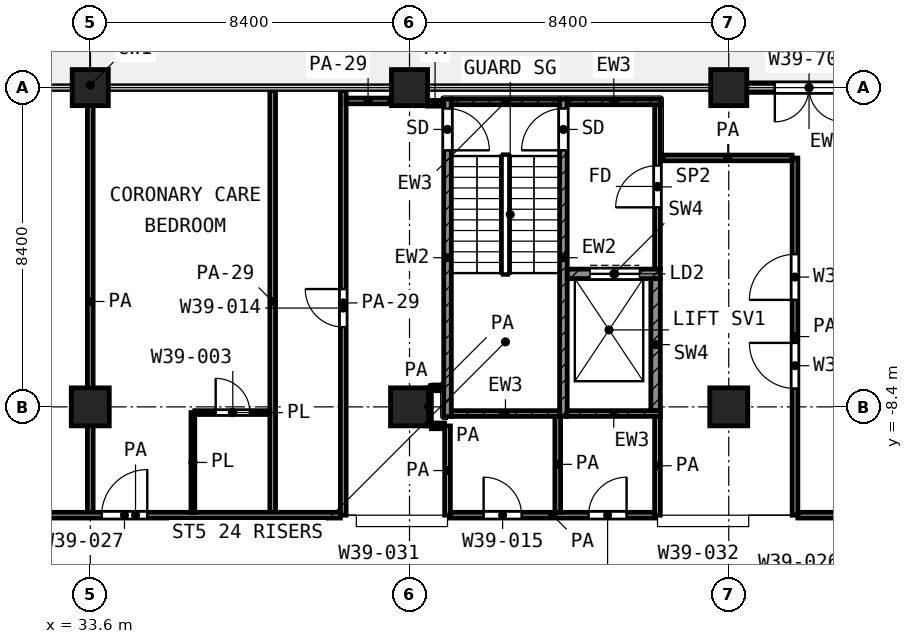
"""IFC4 building model, lengths in metres.
Left out: names, types, materials, properties, quantities, classifications, styles, units other than length and angle.
Written with IfcOpenShell. Run it as: python <this file> out.ifc"""

import sys

from ifc_helpers import new_model, si_unit, direction, frame, frame_2d, origin, origin_2d, place, context, subcontext, project, spatial, rectangle, extrude, element, fill, save


model = new_model("IFC4")
c1 = context("Model", 3, precision=1e-05, world=origin(), true_north=direction((0.0, 1.0)))
c2 = subcontext(c1, "Body", "Model", "MODEL_VIEW")
j1 = project(units=[si_unit("LENGTHUNIT", "METRE"), si_unit("PLANEANGLEUNIT", "RADIAN")], contexts=[c1])
p1 = place(None, origin())
s1 = spatial("IfcSite", under=j1, at=p1, CompositionType="ELEMENT")
p2 = place(p1, origin())
s2 = spatial("IfcBuilding", under=s1, at=p2, CompositionType="ELEMENT")
p3 = place(p2, frame((0.0, 0.0, 171.0)))
s3 = spatial("IfcBuildingStorey", under=s2, at=p3, CompositionType="ELEMENT", Elevation=171.0)
for number, where, z_axis, x_axis in (
    (1, (33.6, 0.0, 0.0), (0.0, 0.0, 1.0), (1.0, 0.0, 0.0)),
    (2, (42.0, 0.0, 0.0), (0.0, 0.0, 1.0), (1.0, 0.0, 0.0)),
    (3, (50.4, 0.0, 0.0), (0.0, 0.0, 1.0), (1.0, 0.0, 0.0)),
):
    element("IfcColumn", number, at=place(p3, frame(where, z_axis=z_axis, x_axis=x_axis)), inside=s3, PredefinedType="COLUMN", context=c2, shape_type="SweptSolid", body=[
        extrude(rectangle(XDim=0.95, YDim=0.95, at=origin_2d()), origin(), (0.0, 0.0, 1.0), 4.2),
    ])
for number, where, z_axis, x_axis in (
    (4, (33.6, -8.4, 0.0), (0.0, 0.0, 1.0), (1.0, 0.0, 0.0)),
    (5, (42.0, -8.4, 0.0), (0.0, 0.0, 1.0), (1.0, 0.0, 0.0)),
    (6, (50.4, -8.4, 0.0), (0.0, 0.0, 1.0), (1.0, 0.0, 0.0)),
):
    element("IfcColumn", number, at=place(p3, frame(where, z_axis=z_axis, x_axis=x_axis)), inside=s3, PredefinedType="COLUMN", context=c2, shape_type="SweptSolid", body=[
        extrude(rectangle(XDim=1.0, YDim=1.0, at=origin_2d()), origin(), (0.0, 0.0, 1.0), 4.2),
    ])
p4 = place(p3, frame((54.15, 0.0, 0.0), z_axis=(0.0, 0.0, 1.0), x_axis=(-1.0, 0.0, 0.0)))
e7 = element("IfcWall", 7, at=p4, inside=s3, PredefinedType="SOLIDWALL", context=c2, shape_type="SweptSolid", body=[
    extrude(rectangle(XDim=3.275, YDim=0.25, at=frame_2d((1.637, 0.0))), origin(), (0.0, 0.0, 1.0), 2.58),
])
p5 = place(p4, frame((0.738, 0.0, 0.0)))
e8 = element("IfcOpeningElement", 8, at=p5, cuts=e7, PredefinedType="OPENING", context=c2, shape_type="SweptSolid", body=[
    extrude(rectangle(XDim=1.8, YDim=2.1, at=frame_2d((0.9, 1.05))), frame((0.0, 0.135, 0.0), z_axis=(0.0, -1.0, 0.0), x_axis=(1.0, 0.0, 0.0)), (0.0, 0.0, 1.0), 0.27),
])
p6 = place(p3, frame((43.0, -8.65, 0.0), z_axis=(0.0, 0.0, 1.0), x_axis=(0.0, 1.0, 0.0)))
e9 = element("IfcWall", 9, at=p6, inside=s3, PredefinedType="SHEAR", context=c2, shape_type="SweptSolid", body=[
    extrude(rectangle(XDim=8.35, YDim=0.2, at=frame_2d((4.175, 0.0))), origin(), (0.0, 0.0, 1.0), 3.6),
])
p7 = place(p6, frame((7.0, 0.0, 0.0)))
e10 = element("IfcOpeningElement", 10, at=p7, cuts=e9, PredefinedType="OPENING", context=c2, shape_type="SweptSolid", body=[
    extrude(rectangle(XDim=1.1, YDim=2.1, at=frame_2d((0.55, 1.05))), frame((0.0, 0.11, 0.0), z_axis=(0.0, -1.0, 0.0), x_axis=(1.0, 0.0, 0.0)), (0.0, 0.0, 1.0), 0.22),
])
p8 = place(p3, frame((46.05, -8.65, 0.0), z_axis=(0.0, 0.0, 1.0), x_axis=(0.0, 1.0, 0.0)))
e11 = element("IfcWall", 11, at=p8, inside=s3, PredefinedType="SHEAR", context=c2, shape_type="SweptSolid", body=[
    extrude(rectangle(XDim=8.35, YDim=0.2, at=frame_2d((4.175, 0.0))), origin(), (0.0, 0.0, 1.0), 3.6),
])
p9 = place(p8, frame((7.0, 0.0, 0.0)))
e12 = element("IfcOpeningElement", 12, at=p9, cuts=e11, PredefinedType="OPENING", context=c2, shape_type="SweptSolid", body=[
    extrude(rectangle(XDim=1.1, YDim=2.1, at=frame_2d((0.55, 1.05))), frame((0.0, 0.11, 0.0), z_axis=(0.0, -1.0, 0.0), x_axis=(1.0, 0.0, 0.0)), (0.0, 0.0, 1.0), 0.22),
])
p10 = place(p3, frame((43.1, -0.375, 0.0), z_axis=(0.0, 0.0, 1.0), x_axis=(1.0, 0.0, 0.0)))
e13 = element("IfcWall", 13, at=p10, inside=s3, PredefinedType="SHEAR", context=c2, shape_type="SweptSolid", body=[
    extrude(rectangle(XDim=2.85, YDim=0.15, at=frame_2d((1.425, 0.0))), origin(), (0.0, 0.0, 1.0), 3.6),
])
p11 = place(p3, frame((46.15, -0.375, 0.0), z_axis=(0.0, 0.0, 1.0), x_axis=(1.0, 0.0, 0.0)))
e14 = element("IfcWall", 14, at=p11, inside=s3, PredefinedType="SHEAR", context=c2, shape_type="SweptSolid", body=[
    extrude(rectangle(XDim=2.45, YDim=0.15, at=frame_2d((1.225, 0.0))), origin(), (0.0, 0.0, 1.0), 3.6),
])
p12 = place(p3, frame((43.1, -8.575, 0.0), z_axis=(0.0, 0.0, 1.0), x_axis=(1.0, 0.0, 0.0)))
e15 = element("IfcWall", 15, at=p12, inside=s3, PredefinedType="SHEAR", context=c2, shape_type="SweptSolid", body=[
    extrude(rectangle(XDim=2.85, YDim=0.15, at=frame_2d((1.425, 0.0))), origin(), (0.0, 0.0, 1.0), 3.6),
])
p13 = place(p3, frame((46.15, -8.575, 0.0), z_axis=(0.0, 0.0, 1.0), x_axis=(1.0, 0.0, 0.0)))
e16 = element("IfcWall", 16, at=p13, inside=s3, PredefinedType="SHEAR", context=c2, shape_type="SweptSolid", body=[
    extrude(rectangle(XDim=2.45, YDim=0.15, at=frame_2d((1.225, 0.0))), origin(), (0.0, 0.0, 1.0), 3.6),
])
p14 = place(p3, frame((46.15, -4.9, 0.0), z_axis=(0.0, 0.0, 1.0), x_axis=(1.0, 0.0, 0.0)))
e17 = element("IfcWall", 17, at=p14, inside=s3, PredefinedType="SHEAR", context=c2, shape_type="SweptSolid", body=[
    extrude(rectangle(XDim=2.45, YDim=0.25, at=frame_2d((1.225, 0.0))), origin(), (0.0, 0.0, 1.0), 3.6),
])
p15 = place(p14, frame((0.6, 0.0, 0.0)))
e18 = element("IfcOpeningElement", 18, at=p15, cuts=e17, PredefinedType="OPENING", context=c2, shape_type="SweptSolid", body=[
    extrude(rectangle(XDim=1.3, YDim=2.1, at=frame_2d((0.65, 1.05))), frame((0.0, 0.135, 0.0), z_axis=(0.0, -1.0, 0.0), x_axis=(1.0, 0.0, 0.0)), (0.0, 0.0, 1.0), 0.27),
])
p16 = place(p3, frame((48.475, -8.5, 0.0), z_axis=(0.0, 0.0, 1.0), x_axis=(0.0, 1.0, 0.0)))
e19 = element("IfcWall", 19, at=p16, inside=s3, PredefinedType="SHEAR", context=c2, shape_type="SweptSolid", body=[
    extrude(rectangle(XDim=3.475, YDim=0.25, at=frame_2d((1.738, 0.0))), origin(), (0.0, 0.0, 1.0), 3.6),
])
p17 = place(p3, frame((48.525, -4.775, 0.0), z_axis=(0.0, 0.0, 1.0), x_axis=(0.0, 1.0, 0.0)))
e20 = element("IfcWall", 20, at=p17, inside=s3, PredefinedType="PARTITIONING", context=c2, shape_type="SweptSolid", body=[
    extrude(rectangle(XDim=4.325, YDim=0.15, at=frame_2d((2.163, 0.0))), origin(), (0.0, 0.0, 1.0), 3.6),
])
p18 = place(p17, frame((1.625, 0.0, 0.0)))
e21 = element("IfcOpeningElement", 21, at=p18, cuts=e20, PredefinedType="OPENING", context=c2, shape_type="SweptSolid", body=[
    extrude(rectangle(XDim=1.1, YDim=2.1, at=frame_2d((0.55, 1.05))), frame((0.0, 0.085, 0.0), z_axis=(0.0, -1.0, 0.0), x_axis=(1.0, 0.0, 0.0)), (0.0, 0.0, 1.0), 0.17),
])
p19 = place(p3, frame((36.35, -8.55, 0.0), z_axis=(0.0, 0.0, 1.0), x_axis=(1.0, 0.0, 0.0)))
e22 = element("IfcWall", 22, at=p19, inside=s3, PredefinedType="PARTITIONING", context=c2, shape_type="SweptSolid", body=[
    extrude(rectangle(XDim=1.975, YDim=0.1, at=frame_2d((0.987, 0.0))), origin(), (0.0, 0.0, 1.0), 3.6),
])
p20 = place(p19, frame((0.55, 0.0, 0.0)))
e23 = element("IfcOpeningElement", 23, at=p20, cuts=e22, PredefinedType="OPENING", context=c2, shape_type="SweptSolid", body=[
    extrude(rectangle(XDim=0.9, YDim=2.1, at=frame_2d((0.45, 1.05))), frame((0.0, 0.06, 0.0), z_axis=(0.0, -1.0, 0.0), x_axis=(1.0, 0.0, 0.0)), (0.0, 0.0, 1.0), 0.12),
])
p21 = place(p3, frame((36.3, -11.175, 0.0), z_axis=(0.0, 0.0, 1.0), x_axis=(0.0, 1.0, 0.0)))
e24 = element("IfcWall", 24, at=p21, inside=s3, PredefinedType="PARTITIONING", context=c2, shape_type="SweptSolid", body=[
    extrude(rectangle(XDim=2.625, YDim=0.1, at=frame_2d((1.312, 0.0))), origin(), (0.0, 0.0, 1.0), 3.6),
])
p22 = place(p3, frame((29.4, -11.25, 0.0), z_axis=(0.0, 0.0, 1.0), x_axis=(1.0, 0.0, 0.0)))
e25 = element("IfcWall", 25, at=p22, inside=s3, PredefinedType="PARTITIONING", context=c2, shape_type="SweptSolid", body=[
    extrude(rectangle(XDim=10.782, YDim=0.15, at=frame_2d((5.391, 0.0))), origin(), (0.0, 0.0, 1.0), 3.6),
])
p23 = place(p22, frame((4.5, 0.0, 0.0)))
e26 = element("IfcOpeningElement", 26, at=p23, cuts=e25, PredefinedType="OPENING", context=c2, shape_type="SweptSolid", body=[
    extrude(rectangle(XDim=1.2, YDim=2.1, at=frame_2d((0.6, 1.05))), frame((0.0, 0.085, 0.0), z_axis=(0.0, -1.0, 0.0), x_axis=(1.0, 0.0, 0.0)), (0.0, 0.0, 1.0), 0.17),
])
p24 = place(p22, frame((1.5, 0.0, 0.0)))
e27 = element("IfcOpeningElement", 27, at=p24, cuts=e25, PredefinedType="OPENING", context=c2, shape_type="SweptSolid", body=[
    extrude(rectangle(XDim=1.2, YDim=2.1, at=frame_2d((0.6, 1.05))), frame((0.0, 0.085, 0.0), z_axis=(0.0, -1.0, 0.0), x_axis=(1.0, 0.0, 0.0)), (0.0, 0.0, 1.0), 0.17),
])
p25 = place(p3, frame((43.075, -11.25, 0.0), z_axis=(0.0, 0.0, 1.0), x_axis=(1.0, 0.0, 0.0)))
e28 = element("IfcWall", 28, at=p25, inside=s3, PredefinedType="PARTITIONING", context=c2, shape_type="SweptSolid", body=[
    extrude(rectangle(XDim=5.375, YDim=0.15, at=frame_2d((2.688, 0.0))), origin(), (0.0, 0.0, 1.0), 3.6),
])
p26 = place(p25, frame((0.875, 0.0, 0.0)))
e29 = element("IfcOpeningElement", 29, at=p26, cuts=e28, PredefinedType="OPENING", context=c2, shape_type="SweptSolid", body=[
    extrude(rectangle(XDim=1.0, YDim=2.1, at=frame_2d((0.5, 1.05))), frame((0.0, 0.085, 0.0), z_axis=(0.0, -1.0, 0.0), x_axis=(1.0, 0.0, 0.0)), (0.0, 0.0, 1.0), 0.17),
])
p27 = place(p25, frame((3.637, 0.0, 0.0)))
e30 = element("IfcOpeningElement", 30, at=p27, cuts=e28, PredefinedType="OPENING", context=c2, shape_type="SweptSolid", body=[
    extrude(rectangle(XDim=1.0, YDim=2.1, at=frame_2d((0.5, 1.05))), frame((0.0, 0.085, 0.0), z_axis=(0.0, -1.0, 0.0), x_axis=(1.0, 0.0, 0.0)), (0.0, 0.0, 1.0), 0.17),
])
p28 = place(p3, frame((52.218, -11.25, 0.0), z_axis=(0.0, 0.0, 1.0), x_axis=(1.0, 0.0, 0.0)))
e31 = element("IfcWall", 31, at=p28, inside=s3, PredefinedType="PARTITIONING", context=c2, shape_type="SweptSolid", body=[
    extrude(rectangle(XDim=14.902, YDim=0.15, at=frame_2d((7.451, 0.0))), origin(), (0.0, 0.0, 1.0), 3.6),
])
p29 = place(p28, frame((12.082, 0.0, 0.0)))
e32 = element("IfcOpeningElement", 32, at=p29, cuts=e31, PredefinedType="OPENING", context=c2, shape_type="SweptSolid", body=[
    extrude(rectangle(XDim=1.0, YDim=2.1, at=frame_2d((0.5, 1.05))), frame((0.0, 0.085, 0.0), z_axis=(0.0, -1.0, 0.0), x_axis=(1.0, 0.0, 0.0)), (0.0, 0.0, 1.0), 0.17),
])
p30 = place(p3, frame((42.576, -8.9, 0.0), z_axis=(0.0, 0.0, 1.0), x_axis=(1.0, 0.0, 0.0)))
e33 = element("IfcWall", 33, at=p30, inside=s3, PredefinedType="PARTITIONING", context=c2, shape_type="SweptSolid", body=[
    extrude(rectangle(XDim=0.347, YDim=0.15, at=frame_2d((0.174, 0.0))), origin(), (0.0, 0.0, 1.0), 3.6),
])
p31 = place(p3, frame((42.576, -7.9, 0.0), z_axis=(0.0, 0.0, 1.0), x_axis=(1.0, 0.0, 0.0)))
e34 = element("IfcWall", 34, at=p31, inside=s3, PredefinedType="PARTITIONING", context=c2, shape_type="SweptSolid", body=[
    extrude(rectangle(XDim=0.244, YDim=0.15, at=frame_2d((0.122, 0.0))), origin(), (0.0, 0.0, 1.0), 3.6),
])
p32 = place(p3, frame((48.68, -1.85, 0.0), z_axis=(0.0, 0.0, 1.0), x_axis=(1.0, 0.0, 0.0)))
e35 = element("IfcWall", 35, at=p32, inside=s3, PredefinedType="PARTITIONING", context=c2, shape_type="SweptSolid", body=[
    extrude(rectangle(XDim=3.387, YDim=0.15, at=frame_2d((1.693, 0.0))), origin(), (0.0, 0.0, 1.0), 3.6),
])
p33 = place(p3, frame((42.475, -0.412, 0.0), z_axis=(0.0, 0.0, 1.0), x_axis=(1.0, 0.0, 0.0)))
e36 = element("IfcWall", 36, at=p33, inside=s3, PredefinedType="PARTITIONING", context=c2, shape_type="SweptSolid", body=[
    extrude(rectangle(XDim=0.395, YDim=0.15, at=frame_2d((0.198, 0.0))), origin(), (0.0, 0.0, 1.0), 3.6),
])
p34 = place(p3, frame((40.332, -0.35, 0.0), z_axis=(0.0, 0.0, 1.0), x_axis=(1.0, 0.0, 0.0)))
e37 = element("IfcWall", 37, at=p34, inside=s3, PredefinedType="PARTITIONING", context=c2, shape_type="SweptSolid", body=[
    extrude(rectangle(XDim=1.156, YDim=0.15, at=frame_2d((0.578, 0.0))), origin(), (0.0, 0.0, 1.0), 2.7),
])
p35 = place(p3, frame((33.6, -11.175, 0.0), z_axis=(0.0, 0.0, 1.0), x_axis=(0.0, 1.0, 0.0)))
e38 = element("IfcWall", 38, at=p35, inside=s3, PredefinedType="PARTITIONING", context=c2, shape_type="SweptSolid", body=[
    extrude(rectangle(XDim=11.095, YDim=0.15, at=frame_2d((5.547, 0.0))), origin(), (0.0, 0.0, 1.0), 3.6),
])
p36 = place(p3, frame((38.4, -11.175, 0.0), z_axis=(0.0, 0.0, 1.0), x_axis=(0.0, 1.0, 0.0)))
e39 = element("IfcWall", 39, at=p36, inside=s3, PredefinedType="PARTITIONING", context=c2, shape_type="SweptSolid", body=[
    extrude(rectangle(XDim=11.095, YDim=0.15, at=frame_2d((5.547, 0.0))), origin(), (0.0, 0.0, 1.0), 2.7),
])
p37 = place(p3, frame((40.257, -11.25, 0.0), z_axis=(0.0, 0.0, 1.0), x_axis=(0.0, 1.0, 0.0)))
e40 = element("IfcWall", 40, at=p37, inside=s3, PredefinedType="PARTITIONING", context=c2, shape_type="SweptSolid", body=[
    extrude(rectangle(XDim=11.17, YDim=0.15, at=frame_2d((5.585, 0.0))), origin(), (0.0, 0.0, 1.0), 2.7),
])
p38 = place(p37, frame((4.95, 0.0, 0.0)))
e41 = element("IfcOpeningElement", 41, at=p38, cuts=e40, PredefinedType="OPENING", context=c2, shape_type="SweptSolid", body=[
    extrude(rectangle(XDim=1.0, YDim=2.1, at=frame_2d((0.5, 1.05))), frame((0.0, 0.085, 0.0), z_axis=(0.0, -1.0, 0.0), x_axis=(1.0, 0.0, 0.0)), (0.0, 0.0, 1.0), 0.17),
])
p39 = place(p3, frame((42.5, -8.899, 0.0), z_axis=(0.0, 0.0, 1.0), x_axis=(0.0, 1.0, 0.0)))
e42 = element("IfcWall", 42, at=p39, inside=s3, PredefinedType="PARTITIONING", context=c2, shape_type="SweptSolid", body=[
    extrude(rectangle(XDim=0.998, YDim=0.15, at=frame_2d((0.499, 0.0))), origin(), (0.0, 0.0, 1.0), 3.6),
])
p40 = place(p3, frame((43.0, -11.25, 0.0), z_axis=(0.0, 0.0, 1.0), x_axis=(0.0, 1.0, 0.0)))
e43 = element("IfcWall", 43, at=p40, inside=s3, PredefinedType="PARTITIONING", context=c2, shape_type="SweptSolid", body=[
    extrude(rectangle(XDim=2.348, YDim=0.15, at=frame_2d((1.174, 0.0))), origin(), (0.0, 0.0, 1.0), 3.6),
])
p41 = place(p3, frame((45.9, -11.175, 0.0), z_axis=(0.0, 0.0, 1.0), x_axis=(0.0, 1.0, 0.0)))
e44 = element("IfcWall", 44, at=p41, inside=s3, PredefinedType="PARTITIONING", context=c2, shape_type="SweptSolid", body=[
    extrude(rectangle(XDim=2.525, YDim=0.15, at=frame_2d((1.263, 0.0))), origin(), (0.0, 0.0, 1.0), 3.6),
])
p42 = place(p3, frame((48.525, -11.25, 0.0), z_axis=(0.0, 0.0, 1.0), x_axis=(0.0, 1.0, 0.0)))
e45 = element("IfcWall", 45, at=p42, inside=s3, PredefinedType="PARTITIONING", context=c2, shape_type="SweptSolid", body=[
    extrude(rectangle(XDim=2.6, YDim=0.15, at=frame_2d((1.3, 0.0))), origin(), (0.0, 0.0, 1.0), 3.6),
])
p43 = place(p3, frame((52.143, -11.25, 0.0), z_axis=(0.0, 0.0, 1.0), x_axis=(0.0, 1.0, 0.0)))
e46 = element("IfcWall", 46, at=p43, inside=s3, PredefinedType="PARTITIONING", context=c2, shape_type="SweptSolid", body=[
    extrude(rectangle(XDim=9.398, YDim=0.15, at=frame_2d((4.699, 0.0))), origin(), (0.0, 0.0, 1.0), 3.6),
])
p44 = place(p43, frame((5.665, 0.0, 0.0)))
e47 = element("IfcOpeningElement", 47, at=p44, cuts=e46, PredefinedType="OPENING", context=c2, shape_type="SweptSolid", body=[
    extrude(rectangle(XDim=1.2, YDim=2.1, at=frame_2d((0.6, 1.05))), frame((0.0, 0.085, 0.0), z_axis=(0.0, -1.0, 0.0), x_axis=(1.0, 0.0, 0.0)), (0.0, 0.0, 1.0), 0.17),
])
p45 = place(p43, frame((3.333, 0.0, 0.0)))
e48 = element("IfcOpeningElement", 48, at=p45, cuts=e46, PredefinedType="OPENING", context=c2, shape_type="SweptSolid", body=[
    extrude(rectangle(XDim=1.2, YDim=2.1, at=frame_2d((0.6, 1.05))), frame((0.0, 0.085, 0.0), z_axis=(0.0, -1.0, 0.0), x_axis=(1.0, 0.0, 0.0)), (0.0, 0.0, 1.0), 0.17),
])
p46 = place(p5, origin())
e49 = element("IfcDoor", 49, at=p46, inside=s3, OperationType="DOUBLE_DOOR_SINGLE_SWING", PredefinedType="DOOR", context=c2, shape_type="SweptSolid", body=[
    extrude(rectangle(XDim=1.8, YDim=2.1, at=frame_2d((0.9, 1.05))), frame((0.0, 0.025, 0.0), z_axis=(0.0, -1.0, 0.0), x_axis=(1.0, 0.0, 0.0)), (0.0, 0.0, 1.0), 0.05),
])
fill(e8, e49)
p47 = place(p7, frame((1.1, 0.0, 0.0), z_axis=(0.0, 0.0, 1.0), x_axis=(-1.0, 0.0, 0.0)))
e50 = element("IfcDoor", 50, at=p47, inside=s3, OperationType="SINGLE_SWING_LEFT", PredefinedType="DOOR", context=c2, shape_type="SweptSolid", body=[
    extrude(rectangle(XDim=1.1, YDim=2.1, at=frame_2d((0.55, 1.05))), frame((0.0, 0.025, 0.0), z_axis=(0.0, -1.0, 0.0), x_axis=(1.0, 0.0, 0.0)), (0.0, 0.0, 1.0), 0.05),
])
fill(e10, e50)
p48 = place(p9, origin())
e51 = element("IfcDoor", 51, at=p48, inside=s3, OperationType="SINGLE_SWING_LEFT", PredefinedType="DOOR", context=c2, shape_type="SweptSolid", body=[
    extrude(rectangle(XDim=1.1, YDim=2.1, at=frame_2d((0.55, 1.05))), frame((0.0, 0.025, 0.0), z_axis=(0.0, -1.0, 0.0), x_axis=(1.0, 0.0, 0.0)), (0.0, 0.0, 1.0), 0.05),
])
fill(e12, e51)
p49 = place(p15, origin())
e52 = element("IfcDoor", 52, at=p49, inside=s3, OperationType="DOUBLE_DOOR_SLIDING", PredefinedType="DOOR", context=c2, shape_type="SweptSolid", body=[
    extrude(rectangle(XDim=1.3, YDim=2.1, at=frame_2d((0.65, 1.05))), frame((0.0, 0.025, 0.0), z_axis=(0.0, -1.0, 0.0), x_axis=(1.0, 0.0, 0.0)), (0.0, 0.0, 1.0), 0.05),
])
fill(e18, e52)
p50 = place(p18, origin())
e53 = element("IfcDoor", 53, at=p50, inside=s3, OperationType="SINGLE_SWING_LEFT", PredefinedType="DOOR", context=c2, shape_type="SweptSolid", body=[
    extrude(rectangle(XDim=1.1, YDim=2.1, at=frame_2d((0.55, 1.05))), frame((0.0, 0.025, 0.0), z_axis=(0.0, -1.0, 0.0), x_axis=(1.0, 0.0, 0.0)), (0.0, 0.0, 1.0), 0.05),
])
fill(e21, e53)
p51 = place(p23, origin())
e54 = element("IfcDoor", 54, at=p51, inside=s3, OperationType="SINGLE_SWING_RIGHT", PredefinedType="DOOR", context=c2, shape_type="SweptSolid", body=[
    extrude(rectangle(XDim=1.2, YDim=2.1, at=frame_2d((0.6, 1.05))), frame((0.0, 0.025, 0.0), z_axis=(0.0, -1.0, 0.0), x_axis=(1.0, 0.0, 0.0)), (0.0, 0.0, 1.0), 0.05),
])
fill(e26, e54)
p52 = place(p20, origin())
e55 = element("IfcDoor", 55, at=p52, inside=s3, OperationType="SINGLE_SWING_LEFT", PredefinedType="DOOR", context=c2, shape_type="SweptSolid", body=[
    extrude(rectangle(XDim=0.9, YDim=2.1, at=frame_2d((0.45, 1.05))), frame((0.0, 0.025, 0.0), z_axis=(0.0, -1.0, 0.0), x_axis=(1.0, 0.0, 0.0)), (0.0, 0.0, 1.0), 0.05),
])
fill(e23, e55)
p53 = place(p38, origin())
e56 = element("IfcDoor", 56, at=p53, inside=s3, OperationType="SINGLE_SWING_RIGHT", PredefinedType="DOOR", context=c2, shape_type="SweptSolid", body=[
    extrude(rectangle(XDim=1.0, YDim=2.1, at=frame_2d((0.5, 1.05))), frame((0.0, 0.025, 0.0), z_axis=(0.0, -1.0, 0.0), x_axis=(1.0, 0.0, 0.0)), (0.0, 0.0, 1.0), 0.05),
])
fill(e41, e56)
p54 = place(p26, origin())
e57 = element("IfcDoor", 57, at=p54, inside=s3, OperationType="SINGLE_SWING_LEFT", PredefinedType="DOOR", context=c2, shape_type="SweptSolid", body=[
    extrude(rectangle(XDim=1.0, YDim=2.1, at=frame_2d((0.5, 1.05))), frame((0.0, 0.025, 0.0), z_axis=(0.0, -1.0, 0.0), x_axis=(1.0, 0.0, 0.0)), (0.0, 0.0, 1.0), 0.05),
])
fill(e29, e57)
p55 = place(p27, origin())
e58 = element("IfcDoor", 58, at=p55, inside=s3, OperationType="SINGLE_SWING_RIGHT", PredefinedType="DOOR", context=c2, shape_type="SweptSolid", body=[
    extrude(rectangle(XDim=1.0, YDim=2.1, at=frame_2d((0.5, 1.05))), frame((0.0, 0.025, 0.0), z_axis=(0.0, -1.0, 0.0), x_axis=(1.0, 0.0, 0.0)), (0.0, 0.0, 1.0), 0.05),
])
fill(e30, e58)
p56 = place(p44, origin())
e59 = element("IfcDoor", 59, at=p56, inside=s3, OperationType="SINGLE_SWING_LEFT", PredefinedType="DOOR", context=c2, shape_type="SweptSolid", body=[
    extrude(rectangle(XDim=1.2, YDim=2.1, at=frame_2d((0.6, 1.05))), frame((0.0, 0.025, 0.0), z_axis=(0.0, -1.0, 0.0), x_axis=(1.0, 0.0, 0.0)), (0.0, 0.0, 1.0), 0.05),
])
fill(e47, e59)
p57 = place(p45, origin())
e60 = element("IfcDoor", 60, at=p57, inside=s3, OperationType="SINGLE_SWING_RIGHT", PredefinedType="DOOR", context=c2, shape_type="SweptSolid", body=[
    extrude(rectangle(XDim=1.2, YDim=2.1, at=frame_2d((0.6, 1.05))), frame((0.0, 0.025, 0.0), z_axis=(0.0, -1.0, 0.0), x_axis=(1.0, 0.0, 0.0)), (0.0, 0.0, 1.0), 0.05),
])
fill(e48, e60)
save(model, sys.argv[1])
